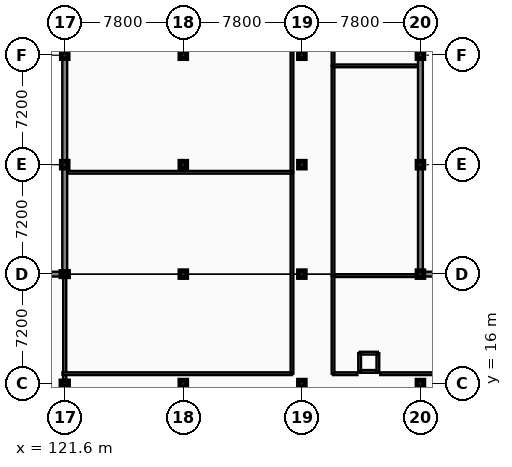
"""IFC4 building model, lengths in metres.
Left out: names, types, materials, properties, quantities, classifications, styles, units other than length and angle.
Written with IfcOpenShell. Run it as: python <this file> out.ifc"""

import sys

from ifc_helpers import new_model, si_unit, direction, frame, frame_2d, origin, origin_2d, place, context, subcontext, project, spatial, rectangle, extrude, element, fill, save


model = new_model("IFC4")
c1 = context("Model", 3, precision=1e-05, world=origin(), true_north=direction((0.0, 1.0)))
c2 = subcontext(c1, "Body", "Model", "MODEL_VIEW")
j1 = project(units=[si_unit("LENGTHUNIT", "METRE"), si_unit("PLANEANGLEUNIT", "RADIAN")], contexts=[c1])
p1 = place(None, origin())
s1 = spatial("IfcSite", under=j1, at=p1, CompositionType="ELEMENT")
p2 = place(p1, origin())
s2 = spatial("IfcBuilding", under=s1, at=p2, CompositionType="ELEMENT")
p3 = place(p2, origin())
s3 = spatial("IfcBuildingStorey", under=s2, at=p3, CompositionType="ELEMENT", Elevation=0.0)
for number, where, z_axis, x_axis in (
    (1, (121.6, 16.0, 0.0), (0.0, 0.0, 1.0), (1.0, 0.0, 0.0)),
    (2, (121.6, 23.2, 0.0), (0.0, 0.0, 1.0), (1.0, 0.0, 0.0)),
):
    element("IfcColumn", number, at=place(p3, frame(where, z_axis=z_axis, x_axis=x_axis)), inside=s3, PredefinedType="PILASTER", context=c2, shape_type="SweptSolid", body=[
        extrude(rectangle(XDim=0.5, YDim=0.35, at=origin_2d()), origin(), (0.0, 0.0, 1.0), 5.4),
    ])
for number, where, z_axis, x_axis in (
    (3, (121.6, 30.4, 0.0), (0.0, 0.0, 1.0), (1.0, 0.0, 0.0)),
    (4, (121.6, 37.6, 0.0), (0.0, 0.0, 1.0), (1.0, 0.0, 0.0)),
    (5, (129.4, 16.0, 0.0), (0.0, 0.0, 1.0), (1.0, 0.0, 0.0)),
    (6, (129.4, 23.2, 0.0), (0.0, 0.0, 1.0), (1.0, 0.0, 0.0)),
    (7, (129.4, 30.4, 0.0), (0.0, 0.0, 1.0), (1.0, 0.0, 0.0)),
    (8, (129.4, 37.6, 0.0), (0.0, 0.0, 1.0), (1.0, 0.0, 0.0)),
    (9, (137.2, 16.0, 0.0), (0.0, 0.0, 1.0), (1.0, 0.0, 0.0)),
    (10, (137.2, 23.2, 0.0), (0.0, 0.0, 1.0), (1.0, 0.0, 0.0)),
    (11, (137.2, 30.4, 0.0), (0.0, 0.0, 1.0), (1.0, 0.0, 0.0)),
    (12, (137.2, 37.6, 0.0), (0.0, 0.0, 1.0), (1.0, 0.0, 0.0)),
    (13, (145.0, 16.0, 0.0), (0.0, 0.0, 1.0), (1.0, 0.0, 0.0)),
    (14, (145.0, 23.2, 0.0), (0.0, 0.0, 1.0), (1.0, 0.0, 0.0)),
    (15, (145.0, 30.4, 0.0), (0.0, 0.0, 1.0), (1.0, 0.0, 0.0)),
    (16, (145.0, 37.6, 0.0), (0.0, 0.0, 1.0), (1.0, 0.0, 0.0)),
):
    element("IfcColumn", number, at=place(p3, frame(where, z_axis=z_axis, x_axis=x_axis)), inside=s3, PredefinedType="COLUMN", context=c2, shape_type="SweptSolid", body=[
        extrude(rectangle(XDim=0.45, YDim=0.45, at=origin_2d()), origin(), (0.0, 0.0, 1.0), 5.4),
    ])
p4 = place(p3, frame((121.6, 8.95, 0.0), z_axis=(0.0, 0.0, 1.0), x_axis=(0.0, 1.0, 0.0)))
e17 = element("IfcWall", 17, at=p4, inside=s3, PredefinedType="PARTITIONING", context=c2, shape_type="SweptSolid", body=[
    extrude(rectangle(XDim=14.1, YDim=0.2, at=frame_2d((7.05, 0.0))), origin(), (0.0, 0.0, 1.0), 3.99),
])
p5 = place(p4, frame((3.936, 0.0, -0.01)))
e18 = element("IfcOpeningElement", 18, at=p5, cuts=e17, PredefinedType="OPENING", context=c2, shape_type="SweptSolid", body=[
    extrude(rectangle(XDim=1.8, YDim=2.26, at=frame_2d((0.9, 1.13))), frame((0.0, 0.11, 0.0), z_axis=(0.0, -1.0, 0.0), x_axis=(1.0, 0.0, 0.0)), (0.0, 0.0, 1.0), 0.22),
])
p6 = place(p3, frame((121.45, 16.65, 0.0), z_axis=(0.0, 0.0, 1.0), x_axis=(1.0, 0.0, 0.0)))
e19 = element("IfcWall", 19, at=p6, inside=s3, PredefinedType="PARTITIONING", context=c2, shape_type="SweptSolid", body=[
    extrude(rectangle(XDim=15.1, YDim=0.18, at=frame_2d((7.55, 0.0))), origin(), (0.0, 0.0, 1.0), 4.64),
])
p7 = place(p6, frame((4.512, 0.0, -0.01)))
e20 = element("IfcOpeningElement", 20, at=p7, cuts=e19, PredefinedType="OPENING", context=c2, shape_type="SweptSolid", body=[
    extrude(rectangle(XDim=1.0, YDim=2.16, at=frame_2d((0.5, 1.08))), frame((0.0, 0.1, 0.0), z_axis=(0.0, -1.0, 0.0), x_axis=(1.0, 0.0, 0.0)), (0.0, 0.0, 1.0), 0.2),
])
p8 = place(p3, frame((136.55, 16.65, 0.0), z_axis=(0.0, 0.0, 1.0), x_axis=(0.0, 1.0, 0.0)))
e21 = element("IfcWall", 21, at=p8, inside=s3, PredefinedType="PARTITIONING", context=c2, shape_type="SweptSolid", body=[
    extrude(rectangle(XDim=13.25, YDim=0.18, at=frame_2d((6.625, 0.0))), origin(), (0.0, 0.0, 1.0), 4.64),
])
p9 = place(p8, frame((3.92, 0.0, -0.01)))
e22 = element("IfcOpeningElement", 22, at=p9, cuts=e21, PredefinedType="OPENING", context=c2, shape_type="SweptSolid", body=[
    extrude(rectangle(XDim=1.0, YDim=2.16, at=frame_2d((0.5, 1.08))), frame((0.0, 0.1, 0.0), z_axis=(0.0, -1.0, 0.0), x_axis=(1.0, 0.0, 0.0)), (0.0, 0.0, 1.0), 0.2),
])
p10 = place(p3, frame((136.55, 29.9, 0.0), z_axis=(0.0, 0.0, 1.0), x_axis=(0.0, 1.0, 0.0)))
e23 = element("IfcWall", 23, at=p10, inside=s3, PredefinedType="PARTITIONING", context=c2, shape_type="SweptSolid", body=[
    extrude(rectangle(XDim=12.35, YDim=0.18, at=frame_2d((6.175, 0.0))), origin(), (0.0, 0.0, 1.0), 4.54),
])
p11 = place(p10, frame((5.675, 0.0, -0.01)))
e24 = element("IfcOpeningElement", 24, at=p11, cuts=e23, PredefinedType="OPENING", context=c2, shape_type="SweptSolid", body=[
    extrude(rectangle(XDim=1.0, YDim=2.16, at=frame_2d((0.5, 1.08))), frame((0.0, 0.1, 0.0), z_axis=(0.0, -1.0, 0.0), x_axis=(1.0, 0.0, 0.0)), (0.0, 0.0, 1.0), 0.2),
])
p12 = place(p3, frame((121.75, 29.9, 0.0), z_axis=(0.0, 0.0, 1.0), x_axis=(1.0, 0.0, 0.0)))
e25 = element("IfcWall", 25, at=p12, inside=s3, PredefinedType="PARTITIONING", context=c2, shape_type="SweptSolid", body=[
    extrude(rectangle(XDim=14.8, YDim=0.18, at=frame_2d((7.4, 0.0))), origin(), (0.0, 0.0, 1.0), 4.64),
])
p13 = place(p3, frame((139.25, 16.65, 0.0), z_axis=(0.0, 0.0, 1.0), x_axis=(1.0, 0.0, 0.0)))
e26 = element("IfcWall", 26, at=p13, inside=s3, PredefinedType="PARTITIONING", context=c2, shape_type="SweptSolid", body=[
    extrude(rectangle(XDim=1.6, YDim=0.18, at=frame_2d((0.8, 0.0))), origin(), (0.0, 0.0, 1.0), 5.04),
])
p14 = place(p3, frame((142.35, 16.65, 0.0), z_axis=(0.0, 0.0, 1.0), x_axis=(1.0, 0.0, 0.0)))
e27 = element("IfcWall", 27, at=p14, inside=s3, PredefinedType="PARTITIONING", context=c2, shape_type="SweptSolid", body=[
    extrude(rectangle(XDim=25.9, YDim=0.18, at=frame_2d((12.95, 0.0))), origin(), (0.0, 0.0, 1.0), 4.64),
])
p15 = place(p14, frame((7.968, 0.0, -0.01)))
e28 = element("IfcOpeningElement", 28, at=p15, cuts=e27, PredefinedType="OPENING", context=c2, shape_type="SweptSolid", body=[
    extrude(rectangle(XDim=1.0, YDim=2.16, at=frame_2d((0.5, 1.08))), frame((0.0, 0.1, 0.0), z_axis=(0.0, -1.0, 0.0), x_axis=(1.0, 0.0, 0.0)), (0.0, 0.0, 1.0), 0.2),
])
p16 = place(p3, frame((139.25, 23.1, 0.0), z_axis=(0.0, 0.0, 1.0), x_axis=(1.0, 0.0, 0.0)))
e29 = element("IfcWall", 29, at=p16, inside=s3, PredefinedType="PARTITIONING", context=c2, shape_type="SweptSolid", body=[
    extrude(rectangle(XDim=5.6, YDim=0.18, at=frame_2d((2.8, 0.0))), origin(), (0.0, 0.0, 1.0), 4.64),
])
p17 = place(p3, frame((139.25, 16.65, 0.0), z_axis=(0.0, 0.0, 1.0), x_axis=(0.0, 1.0, 0.0)))
e30 = element("IfcWall", 30, at=p17, inside=s3, PredefinedType="PARTITIONING", context=c2, shape_type="SweptSolid", body=[
    extrude(rectangle(XDim=6.45, YDim=0.18, at=frame_2d((3.225, 0.0))), origin(), (0.0, 0.0, 1.0), 4.64),
])
p18 = place(p3, frame((139.25, 23.1, 0.0), z_axis=(0.0, 0.0, 1.0), x_axis=(0.0, 1.0, 0.0)))
e31 = element("IfcWall", 31, at=p18, inside=s3, PredefinedType="PARTITIONING", context=c2, shape_type="SweptSolid", body=[
    extrude(rectangle(XDim=13.8, YDim=0.18, at=frame_2d((6.9, 0.0))), origin(), (0.0, 0.0, 1.0), 4.54),
])
p19 = place(p18, frame((6.4, 0.0, -0.01)))
e32 = element("IfcOpeningElement", 32, at=p19, cuts=e31, PredefinedType="OPENING", context=c2, shape_type="SweptSolid", body=[
    extrude(rectangle(XDim=1.0, YDim=2.16, at=frame_2d((0.5, 1.08))), frame((0.0, 0.1, 0.0), z_axis=(0.0, -1.0, 0.0), x_axis=(1.0, 0.0, 0.0)), (0.0, 0.0, 1.0), 0.2),
])
p20 = place(p3, frame((139.25, 36.9, 0.0), z_axis=(0.0, 0.0, 1.0), x_axis=(0.0, 1.0, 0.0)))
e33 = element("IfcWall", 33, at=p20, inside=s3, PredefinedType="PARTITIONING", context=c2, shape_type="SweptSolid", body=[
    extrude(rectangle(XDim=5.35, YDim=0.18, at=frame_2d((2.675, 0.0))), origin(), (0.0, 0.0, 1.0), 4.54),
])
p21 = place(p20, frame((2.175, 0.0, -0.01)))
e34 = element("IfcOpeningElement", 34, at=p21, cuts=e33, PredefinedType="OPENING", context=c2, shape_type="SweptSolid", body=[
    extrude(rectangle(XDim=1.0, YDim=2.16, at=frame_2d((0.5, 1.08))), frame((0.0, 0.1, 0.0), z_axis=(0.0, -1.0, 0.0), x_axis=(1.0, 0.0, 0.0)), (0.0, 0.0, 1.0), 0.2),
])
p22 = place(p3, frame((139.25, 36.9, 0.0), z_axis=(0.0, 0.0, 1.0), x_axis=(1.0, 0.0, 0.0)))
e35 = element("IfcWall", 35, at=p22, inside=s3, PredefinedType="PARTITIONING", context=c2, shape_type="SweptSolid", body=[
    extrude(rectangle(XDim=5.6, YDim=0.18, at=frame_2d((2.8, 0.0))), origin(), (0.0, 0.0, 1.0), 4.64),
])
p23 = place(p3, frame((152.8, 23.2, 0.0), z_axis=(0.0, 0.0, 1.0), x_axis=(-1.0, 0.0, 0.0)))
e36 = element("IfcWall", 36, at=p23, inside=s3, PredefinedType="SOLIDWALL", context=c2, shape_type="SweptSolid", body=[
    extrude(rectangle(XDim=7.8, YDim=0.32, at=frame_2d((3.9, 0.0))), origin(), (0.0, 0.0, 1.0), 4.64),
])
p24 = place(p23, frame((0.46, 0.0, 0.9)))
e37 = element("IfcOpeningElement", 37, at=p24, cuts=e36, PredefinedType="OPENING", context=c2, shape_type="SweptSolid", body=[
    extrude(rectangle(XDim=2.4, YDim=2.35, at=frame_2d((1.2, 1.175))), frame((0.0, 0.17, 0.0), z_axis=(0.0, -1.0, 0.0), x_axis=(1.0, 0.0, 0.0)), (0.0, 0.0, 1.0), 0.34),
])
p25 = place(p23, frame((4.86, 0.0, 0.9)))
e38 = element("IfcOpeningElement", 38, at=p25, cuts=e36, PredefinedType="OPENING", context=c2, shape_type="SweptSolid", body=[
    extrude(rectangle(XDim=2.4, YDim=2.35, at=frame_2d((1.2, 1.175))), frame((0.0, 0.17, 0.0), z_axis=(0.0, -1.0, 0.0), x_axis=(1.0, 0.0, 0.0)), (0.0, 0.0, 1.0), 0.34),
])
p26 = place(p3, frame((121.6, 30.4, 0.0), z_axis=(0.0, 0.0, 1.0), x_axis=(0.0, -1.0, 0.0)))
e39 = element("IfcWall", 39, at=p26, inside=s3, PredefinedType="SOLIDWALL", context=c2, shape_type="SweptSolid", body=[
    extrude(rectangle(XDim=7.2, YDim=0.32, at=frame_2d((3.6, 0.0))), origin(), (0.0, 0.0, 1.0), 3.99),
])
p27 = place(p26, frame((2.6, 0.0, -0.01)))
e40 = element("IfcOpeningElement", 40, at=p27, cuts=e39, PredefinedType="OPENING", context=c2, shape_type="SweptSolid", body=[
    extrude(rectangle(XDim=2.0, YDim=2.41, at=frame_2d((1.0, 1.205))), frame((0.0, 0.17, 0.0), z_axis=(0.0, -1.0, 0.0), x_axis=(1.0, 0.0, 0.0)), (0.0, 0.0, 1.0), 0.34),
])
p28 = place(p3, frame((121.6, 37.6, 0.0), z_axis=(0.0, 0.0, 1.0), x_axis=(0.0, -1.0, 0.0)))
e41 = element("IfcWall", 41, at=p28, inside=s3, PredefinedType="SOLIDWALL", context=c2, shape_type="SweptSolid", body=[
    extrude(rectangle(XDim=7.2, YDim=0.32, at=frame_2d((3.6, 0.0))), origin(), (0.0, 0.0, 1.0), 4.54),
])
p29 = place(p28, frame((0.46, 0.0, 0.9)))
e42 = element("IfcOpeningElement", 42, at=p29, cuts=e41, PredefinedType="OPENING", context=c2, shape_type="SweptSolid", body=[
    extrude(rectangle(XDim=1.8, YDim=2.2, at=frame_2d((0.9, 1.1))), frame((0.0, 0.17, 0.0), z_axis=(0.0, -1.0, 0.0), x_axis=(1.0, 0.0, 0.0)), (0.0, 0.0, 1.0), 0.34),
])
p30 = place(p28, frame((4.86, 0.0, 0.9)))
e43 = element("IfcOpeningElement", 43, at=p30, cuts=e41, PredefinedType="OPENING", context=c2, shape_type="SweptSolid", body=[
    extrude(rectangle(XDim=1.8, YDim=2.2, at=frame_2d((0.9, 1.1))), frame((0.0, 0.17, 0.0), z_axis=(0.0, -1.0, 0.0), x_axis=(1.0, 0.0, 0.0)), (0.0, 0.0, 1.0), 0.34),
])
p31 = place(p3, frame((121.6, 42.4, 0.0), z_axis=(0.0, 0.0, 1.0), x_axis=(0.0, -1.0, 0.0)))
e44 = element("IfcWall", 44, at=p31, inside=s3, PredefinedType="SOLIDWALL", context=c2, shape_type="SweptSolid", body=[
    extrude(rectangle(XDim=4.8, YDim=0.32, at=frame_2d((2.4, 0.0))), origin(), (0.0, 0.0, 1.0), 4.54),
])
p32 = place(p31, frame((1.46, 0.0, 0.9)))
e45 = element("IfcOpeningElement", 45, at=p32, cuts=e44, PredefinedType="OPENING", context=c2, shape_type="SweptSolid", body=[
    extrude(rectangle(XDim=1.8, YDim=2.2, at=frame_2d((0.9, 1.1))), frame((0.0, 0.17, 0.0), z_axis=(0.0, -1.0, 0.0), x_axis=(1.0, 0.0, 0.0)), (0.0, 0.0, 1.0), 0.34),
])
p33 = place(p3, frame((145.0, 23.2, 0.0), z_axis=(0.0, 0.0, 1.0), x_axis=(0.0, 1.0, 0.0)))
e46 = element("IfcWall", 46, at=p33, inside=s3, PredefinedType="SOLIDWALL", context=c2, shape_type="SweptSolid", body=[
    extrude(rectangle(XDim=7.2, YDim=0.32, at=frame_2d((3.6, 0.0))), origin(), (0.0, 0.0, 1.0), 4.54),
])
p34 = place(p33, frame((0.46, 0.0, 0.9)))
e47 = element("IfcOpeningElement", 47, at=p34, cuts=e46, PredefinedType="OPENING", context=c2, shape_type="SweptSolid", body=[
    extrude(rectangle(XDim=1.8, YDim=2.2, at=frame_2d((0.9, 1.1))), frame((0.0, 0.17, 0.0), z_axis=(0.0, -1.0, 0.0), x_axis=(1.0, 0.0, 0.0)), (0.0, 0.0, 1.0), 0.34),
])
p35 = place(p33, frame((4.86, 0.0, 0.9)))
e48 = element("IfcOpeningElement", 48, at=p35, cuts=e46, PredefinedType="OPENING", context=c2, shape_type="SweptSolid", body=[
    extrude(rectangle(XDim=1.8, YDim=2.2, at=frame_2d((0.9, 1.1))), frame((0.0, 0.17, 0.0), z_axis=(0.0, -1.0, 0.0), x_axis=(1.0, 0.0, 0.0)), (0.0, 0.0, 1.0), 0.34),
])
p36 = place(p3, frame((145.0, 30.4, 0.0), z_axis=(0.0, 0.0, 1.0), x_axis=(0.0, 1.0, 0.0)))
e49 = element("IfcWall", 49, at=p36, inside=s3, PredefinedType="SOLIDWALL", context=c2, shape_type="SweptSolid", body=[
    extrude(rectangle(XDim=7.2, YDim=0.32, at=frame_2d((3.6, 0.0))), origin(), (0.0, 0.0, 1.0), 4.54),
])
p37 = place(p36, frame((0.46, 0.0, 0.9)))
e50 = element("IfcOpeningElement", 50, at=p37, cuts=e49, PredefinedType="OPENING", context=c2, shape_type="SweptSolid", body=[
    extrude(rectangle(XDim=1.8, YDim=2.2, at=frame_2d((0.9, 1.1))), frame((0.0, 0.17, 0.0), z_axis=(0.0, -1.0, 0.0), x_axis=(1.0, 0.0, 0.0)), (0.0, 0.0, 1.0), 0.34),
])
p38 = place(p36, frame((4.46, 0.0, 0.9)))
e51 = element("IfcOpeningElement", 51, at=p38, cuts=e49, PredefinedType="OPENING", context=c2, shape_type="SweptSolid", body=[
    extrude(rectangle(XDim=1.8, YDim=2.2, at=frame_2d((0.9, 1.1))), frame((0.0, 0.17, 0.0), z_axis=(0.0, -1.0, 0.0), x_axis=(1.0, 0.0, 0.0)), (0.0, 0.0, 1.0), 0.34),
])
p39 = place(p3, frame((145.0, 37.6, 0.0), z_axis=(0.0, 0.0, 1.0), x_axis=(0.0, 1.0, 0.0)))
e52 = element("IfcWall", 52, at=p39, inside=s3, PredefinedType="SOLIDWALL", context=c2, shape_type="SweptSolid", body=[
    extrude(rectangle(XDim=4.8, YDim=0.32, at=frame_2d((2.4, 0.0))), origin(), (0.0, 0.0, 1.0), 4.54),
])
p40 = place(p39, frame((1.46, 0.0, 0.9)))
e53 = element("IfcOpeningElement", 53, at=p40, cuts=e52, PredefinedType="OPENING", context=c2, shape_type="SweptSolid", body=[
    extrude(rectangle(XDim=1.8, YDim=2.2, at=frame_2d((0.9, 1.1))), frame((0.0, 0.17, 0.0), z_axis=(0.0, -1.0, 0.0), x_axis=(1.0, 0.0, 0.0)), (0.0, 0.0, 1.0), 0.34),
])
p41 = place(p3, frame((121.6, 23.2, 0.0), z_axis=(0.0, 0.0, 1.0), x_axis=(-1.0, 0.0, 0.0)))
e54 = element("IfcWall", 54, at=p41, inside=s3, PredefinedType="SOLIDWALL", context=c2, shape_type="SweptSolid", body=[
    extrude(rectangle(XDim=4.8, YDim=0.32, at=frame_2d((2.4, 0.0))), origin(), (0.0, 0.0, 1.0), 3.99),
])
p42 = place(p41, frame((1.46, 0.0, 0.9)))
e55 = element("IfcOpeningElement", 55, at=p42, cuts=e54, PredefinedType="OPENING", context=c2, shape_type="SweptSolid", body=[
    extrude(rectangle(XDim=1.8, YDim=2.2, at=frame_2d((0.9, 1.1))), frame((0.0, 0.17, 0.0), z_axis=(0.0, -1.0, 0.0), x_axis=(1.0, 0.0, 0.0)), (0.0, 0.0, 1.0), 0.34),
])
p43 = place(p3, frame((141.0, 16.8, 0.0), z_axis=(0.0, 0.0, 1.0), x_axis=(1.0, 0.0, 0.0)))
e56 = element("IfcWall", 56, at=p43, inside=s3, PredefinedType="SOLIDWALL", context=c2, shape_type="SweptSolid", body=[
    extrude(rectangle(XDim=1.2, YDim=0.18, at=frame_2d((0.6, 0.0))), origin(), (0.0, 0.0, 1.0), 5.07),
])
p44 = place(p43, frame((0.2, 0.0, -0.01)))
e57 = element("IfcOpeningElement", 57, at=p44, cuts=e56, PredefinedType="OPENING", context=c2, shape_type="SweptSolid", body=[
    extrude(rectangle(XDim=0.8, YDim=2.06, at=frame_2d((0.4, 1.03))), frame((0.0, 0.1, 0.0), z_axis=(0.0, -1.0, 0.0), x_axis=(1.0, 0.0, 0.0)), (0.0, 0.0, 1.0), 0.2),
])
for number, where, z_axis, x_axis in (
    (58, (142.2, 16.8, 0.0), (0.0, 0.0, 1.0), (0.0, 1.0, 0.0)),
    (59, (142.2, 18.0, 0.0), (0.0, 0.0, 1.0), (-1.0, 0.0, 0.0)),
    (60, (141.0, 18.0, 0.0), (0.0, 0.0, 1.0), (0.0, -1.0, 0.0)),
):
    element("IfcWall", number, at=place(p3, frame(where, z_axis=z_axis, x_axis=x_axis)), inside=s3, PredefinedType="SOLIDWALL", context=c2, shape_type="SweptSolid", body=[
        extrude(rectangle(XDim=1.2, YDim=0.18, at=frame_2d((0.6, 0.0))), origin(), (0.0, 0.0, 1.0), 5.07),
    ])
p45 = place(p7, frame((1.0, 0.0, 0.01), z_axis=(0.0, 0.0, 1.0), x_axis=(-1.0, 0.0, 0.0)))
e61 = element("IfcDoor", 61, at=p45, inside=s3, OperationType="SINGLE_SWING_RIGHT", PredefinedType="DOOR", context=c2, shape_type="SweptSolid", body=[
    extrude(rectangle(XDim=1.0, YDim=2.15, at=frame_2d((0.5, 1.075))), frame((0.0, 0.025, 0.0), z_axis=(0.0, -1.0, 0.0), x_axis=(1.0, 0.0, 0.0)), (0.0, 0.0, 1.0), 0.05),
])
fill(e20, e61)
p46 = place(p9, frame((0.0, 0.0, 0.01)))
e62 = element("IfcDoor", 62, at=p46, inside=s3, OperationType="SINGLE_SWING_LEFT", PredefinedType="DOOR", context=c2, shape_type="SweptSolid", body=[
    extrude(rectangle(XDim=1.0, YDim=2.15, at=frame_2d((0.5, 1.075))), frame((0.0, 0.025, 0.0), z_axis=(0.0, -1.0, 0.0), x_axis=(1.0, 0.0, 0.0)), (0.0, 0.0, 1.0), 0.05),
])
fill(e22, e62)
p47 = place(p11, frame((0.0, 0.0, 0.01)))
e63 = element("IfcDoor", 63, at=p47, inside=s3, OperationType="SINGLE_SWING_RIGHT", PredefinedType="DOOR", context=c2, shape_type="SweptSolid", body=[
    extrude(rectangle(XDim=1.0, YDim=2.15, at=frame_2d((0.5, 1.075))), frame((0.0, 0.025, 0.0), z_axis=(0.0, -1.0, 0.0), x_axis=(1.0, 0.0, 0.0)), (0.0, 0.0, 1.0), 0.05),
])
fill(e24, e63)
p48 = place(p19, frame((0.0, 0.0, 0.01)))
e64 = element("IfcDoor", 64, at=p48, inside=s3, OperationType="SINGLE_SWING_RIGHT", PredefinedType="DOOR", context=c2, shape_type="SweptSolid", body=[
    extrude(rectangle(XDim=1.0, YDim=2.15, at=frame_2d((0.5, 1.075))), frame((0.0, 0.025, 0.0), z_axis=(0.0, -1.0, 0.0), x_axis=(1.0, 0.0, 0.0)), (0.0, 0.0, 1.0), 0.05),
])
fill(e32, e64)
p49 = place(p25, origin())
e65 = element("IfcWindow", 65, at=p49, inside=s3, PartitioningType="TRIPLE_PANEL_VERTICAL", PredefinedType="WINDOW", context=c2, shape_type="SweptSolid", body=[
    extrude(rectangle(XDim=2.4, YDim=2.35, at=frame_2d((1.2, 1.175))), frame((0.0, 0.03, 0.0), z_axis=(0.0, -1.0, 0.0), x_axis=(1.0, 0.0, 0.0)), (0.0, 0.0, 1.0), 0.06),
])
fill(e38, e65)
p50 = place(p27, frame((0.0, 0.0, 0.01)))
e66 = element("IfcDoor", 66, at=p50, inside=s3, OperationType="DOUBLE_SWING_LEFT", PredefinedType="DOOR", context=c2, shape_type="SweptSolid", body=[
    extrude(rectangle(XDim=2.0, YDim=2.4, at=frame_2d((1.0, 1.2))), frame((0.0, 0.025, 0.0), z_axis=(0.0, -1.0, 0.0), x_axis=(1.0, 0.0, 0.0)), (0.0, 0.0, 1.0), 0.05),
])
fill(e40, e66)
p51 = place(p29, origin())
e67 = element("IfcWindow", 67, at=p51, inside=s3, PartitioningType="DOUBLE_PANEL_VERTICAL", PredefinedType="WINDOW", context=c2, shape_type="SweptSolid", body=[
    extrude(rectangle(XDim=1.8, YDim=2.2, at=frame_2d((0.9, 1.1))), frame((0.0, 0.03, 0.0), z_axis=(0.0, -1.0, 0.0), x_axis=(1.0, 0.0, 0.0)), (0.0, 0.0, 1.0), 0.06),
])
fill(e42, e67)
p52 = place(p30, origin())
e68 = element("IfcWindow", 68, at=p52, inside=s3, PartitioningType="DOUBLE_PANEL_VERTICAL", PredefinedType="WINDOW", context=c2, shape_type="SweptSolid", body=[
    extrude(rectangle(XDim=1.8, YDim=2.2, at=frame_2d((0.9, 1.1))), frame((0.0, 0.03, 0.0), z_axis=(0.0, -1.0, 0.0), x_axis=(1.0, 0.0, 0.0)), (0.0, 0.0, 1.0), 0.06),
])
fill(e43, e68)
p53 = place(p34, origin())
e69 = element("IfcWindow", 69, at=p53, inside=s3, PartitioningType="DOUBLE_PANEL_VERTICAL", PredefinedType="WINDOW", context=c2, shape_type="SweptSolid", body=[
    extrude(rectangle(XDim=1.8, YDim=2.2, at=frame_2d((0.9, 1.1))), frame((0.0, 0.03, 0.0), z_axis=(0.0, -1.0, 0.0), x_axis=(1.0, 0.0, 0.0)), (0.0, 0.0, 1.0), 0.06),
])
fill(e47, e69)
p54 = place(p35, origin())
e70 = element("IfcWindow", 70, at=p54, inside=s3, PartitioningType="DOUBLE_PANEL_VERTICAL", PredefinedType="WINDOW", context=c2, shape_type="SweptSolid", body=[
    extrude(rectangle(XDim=1.8, YDim=2.2, at=frame_2d((0.9, 1.1))), frame((0.0, 0.03, 0.0), z_axis=(0.0, -1.0, 0.0), x_axis=(1.0, 0.0, 0.0)), (0.0, 0.0, 1.0), 0.06),
])
fill(e48, e70)
p55 = place(p37, origin())
e71 = element("IfcWindow", 71, at=p55, inside=s3, PartitioningType="DOUBLE_PANEL_VERTICAL", PredefinedType="WINDOW", context=c2, shape_type="SweptSolid", body=[
    extrude(rectangle(XDim=1.8, YDim=2.2, at=frame_2d((0.9, 1.1))), frame((0.0, 0.03, 0.0), z_axis=(0.0, -1.0, 0.0), x_axis=(1.0, 0.0, 0.0)), (0.0, 0.0, 1.0), 0.06),
])
fill(e50, e71)
p56 = place(p38, origin())
e72 = element("IfcWindow", 72, at=p56, inside=s3, PartitioningType="DOUBLE_PANEL_VERTICAL", PredefinedType="WINDOW", context=c2, shape_type="SweptSolid", body=[
    extrude(rectangle(XDim=1.8, YDim=2.2, at=frame_2d((0.9, 1.1))), frame((0.0, 0.03, 0.0), z_axis=(0.0, -1.0, 0.0), x_axis=(1.0, 0.0, 0.0)), (0.0, 0.0, 1.0), 0.06),
])
fill(e51, e72)
p57 = place(p44, frame((0.0, 0.0, 0.01)))
e73 = element("IfcDoor", 73, at=p57, inside=s3, OperationType="SINGLE_SWING_RIGHT", PredefinedType="DOOR", context=c2, shape_type="SweptSolid", body=[
    extrude(rectangle(XDim=0.8, YDim=2.05, at=frame_2d((0.4, 1.025))), frame((0.0, 0.025, 0.0), z_axis=(0.0, -1.0, 0.0), x_axis=(1.0, 0.0, 0.0)), (0.0, 0.0, 1.0), 0.05),
])
fill(e57, e73)
save(model, sys.argv[1])
